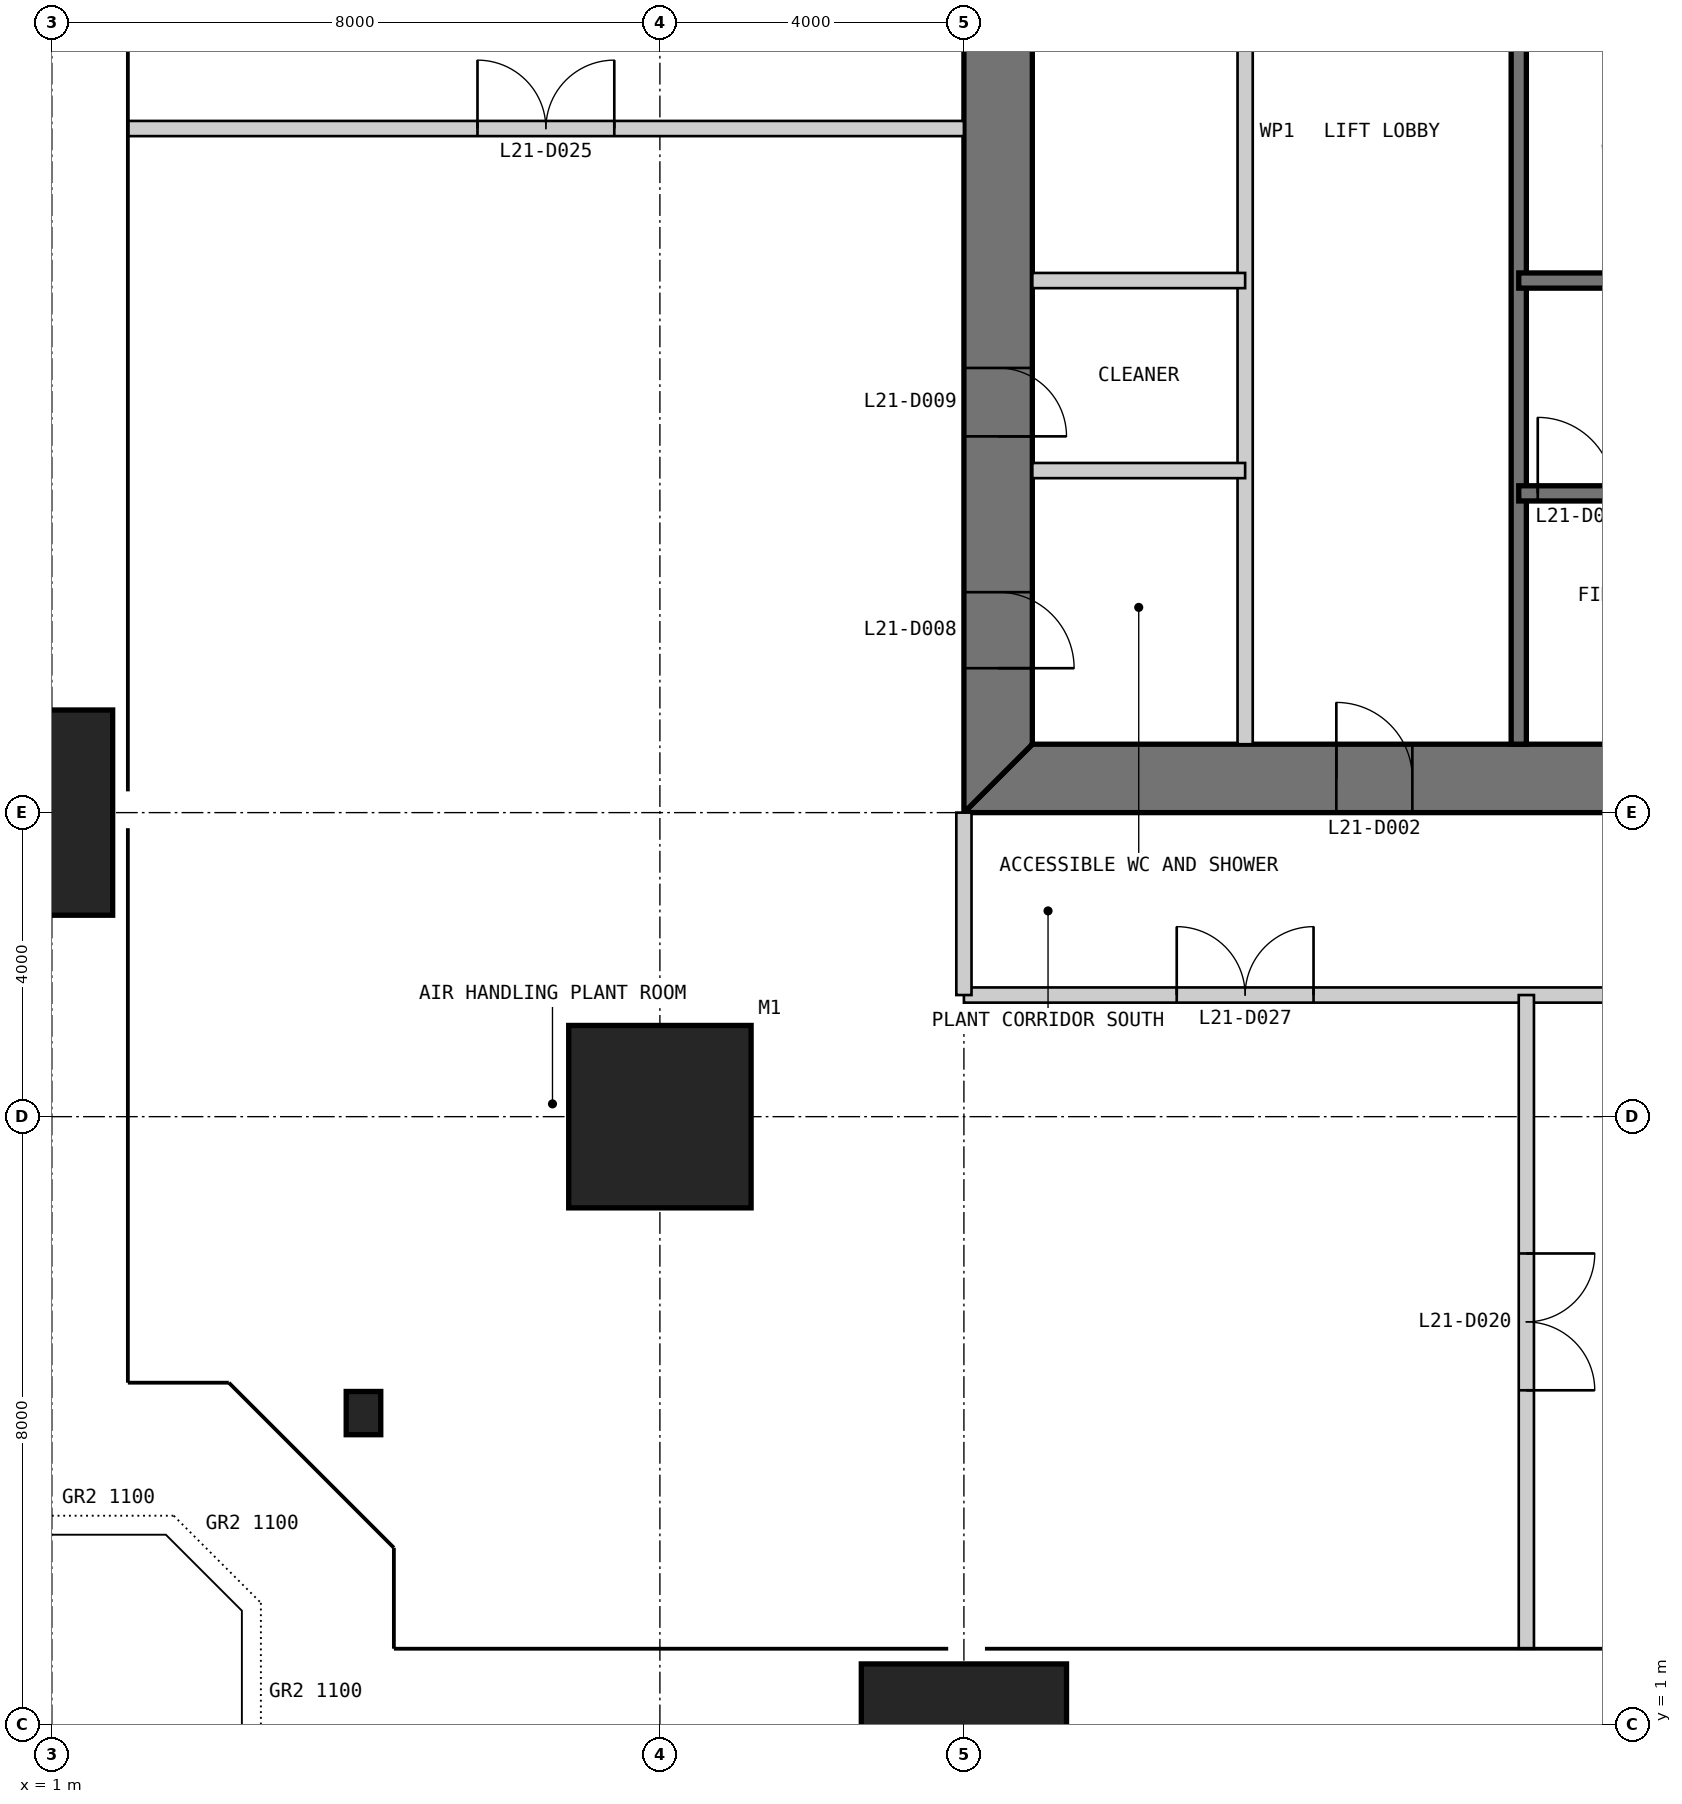
"""IFC4 building model, lengths in metres.
Left out: names, types, materials, properties, quantities, classifications, styles, units other than length and angle.
Written with IfcOpenShell. Run it as: python <this file> out.ifc"""

import sys

from ifc_helpers import new_model, si_unit, direction, frame, frame_2d, origin, origin_2d, place, context, subcontext, project, spatial, polyline, rectangle, i_section, outline, extrude, element, fill, save


model = new_model("IFC4")
c1 = context("Model", 3, precision=1e-05, world=origin(), true_north=direction((0.0, 1.0)))
c2 = subcontext(c1, "Body", "Model", "MODEL_VIEW")
j1 = project(units=[si_unit("LENGTHUNIT", "METRE"), si_unit("PLANEANGLEUNIT", "RADIAN")], contexts=[c1])
p1 = place(None, origin())
s1 = spatial("IfcSite", under=j1, at=p1, CompositionType="ELEMENT")
p2 = place(p1, origin())
s2 = spatial("IfcBuilding", under=s1, at=p2, CompositionType="ELEMENT")
p3 = place(p2, frame((0.0, 0.0, 91.0)))
s3 = spatial("IfcBuildingStorey", under=s2, at=p3, CompositionType="ELEMENT", Elevation=91.0)
p4 = place(p3, frame((9.0, 9.0, 0.0), z_axis=(0.0, 0.0, 1.0), x_axis=(1.0, 0.0, 0.0)))
e1 = element("IfcColumn", 1, at=p4, inside=s3, PredefinedType="COLUMN", context=c2, shape_type="SweptSolid", body=[
    extrude(rectangle(XDim=2.4, YDim=2.4, at=origin_2d()), origin(), (0.0, 0.0, 1.0), 6.0),
])
p5 = place(p3, frame((13.0, 1.0, 0.0), z_axis=(0.0, 0.0, 1.0), x_axis=(1.0, 0.0, 0.0)))
e2 = element("IfcColumn", 2, at=p5, inside=s3, PredefinedType="COLUMN", context=c2, shape_type="SweptSolid", body=[
    extrude(rectangle(XDim=2.7, YDim=1.6, at=origin_2d()), origin(), (0.0, 0.0, 1.0), 6.0),
])
p6 = place(p3, frame((1.0, 13.0, 0.0), z_axis=(0.0, 0.0, 1.0), x_axis=(1.0, 0.0, 0.0)))
e3 = element("IfcColumn", 3, at=p6, inside=s3, PredefinedType="COLUMN", context=c2, shape_type="SweptSolid", body=[
    extrude(rectangle(XDim=1.6, YDim=2.7, at=origin_2d()), origin(), (0.0, 0.0, 1.0), 6.0),
])
p7 = place(p3, frame((5.1, 5.1, 0.0), z_axis=(0.0, 0.0, 1.0), x_axis=(1.0, 0.0, 0.0)))
e4 = element("IfcColumn", 4, at=p7, inside=s3, PredefinedType="COLUMN", context=c2, shape_type="SweptSolid", body=[
    extrude(i_section(OverallWidth=0.455, OverallDepth=0.569, WebThickness=0.078, FlangeThickness=0.125, at=origin_2d()), origin(), (0.0, 0.0, 1.0), 4.6),
])
p8 = place(p3, frame((13.0, 13.45, 0.0), z_axis=(0.0, 0.0, 1.0), x_axis=(1.0, 0.0, 0.0)))
e5 = element("IfcWall", 5, at=p8, inside=s3, PredefinedType="SHEAR", context=c2, shape_type="SweptSolid", body=[
    extrude(outline(polyline([(0.0, -0.45), (24.0, -0.45), (23.1, 0.45), (0.9, 0.45), (0.0, -0.45)])), origin(), (0.0, 0.0, 1.0), 6.0),
])
p9 = place(p8, frame((4.9, 0.0, 0.0)))
e6 = element("IfcOpeningElement", 6, at=p9, cuts=e5, PredefinedType="OPENING", context=c2, shape_type="SweptSolid", body=[
    extrude(rectangle(XDim=1.0, YDim=2.2, at=frame_2d((0.5, 1.1))), frame((0.0, 0.46, 0.0), z_axis=(0.0, -1.0, 0.0), x_axis=(1.0, 0.0, 0.0)), (0.0, 0.0, 1.0), 0.92),
])
p10 = place(p8, frame((8.9, 0.0, 0.0)))
e7 = element("IfcOpeningElement", 7, at=p10, cuts=e5, PredefinedType="OPENING", context=c2, shape_type="SweptSolid", body=[
    extrude(rectangle(XDim=1.1, YDim=2.2, at=frame_2d((0.55, 1.1))), frame((0.0, 0.46, 0.0), z_axis=(0.0, -1.0, 0.0), x_axis=(1.0, 0.0, 0.0)), (0.0, 0.0, 1.0), 0.92),
])
p11 = place(p8, frame((15.05, 0.0, 0.0)))
e8 = element("IfcOpeningElement", 8, at=p11, cuts=e5, PredefinedType="OPENING", context=c2, shape_type="SweptSolid", body=[
    extrude(rectangle(XDim=0.9, YDim=2.2, at=frame_2d((0.45, 1.1))), frame((0.0, 0.46, 0.0), z_axis=(0.0, -1.0, 0.0), x_axis=(1.0, 0.0, 0.0)), (0.0, 0.0, 1.0), 0.92),
])
p12 = place(p8, frame((17.9, 0.0, 0.0)))
e9 = element("IfcOpeningElement", 9, at=p12, cuts=e5, PredefinedType="OPENING", context=c2, shape_type="SweptSolid", body=[
    extrude(rectangle(XDim=1.0, YDim=2.2, at=frame_2d((0.5, 1.1))), frame((0.0, 0.46, 0.0), z_axis=(0.0, -1.0, 0.0), x_axis=(1.0, 0.0, 0.0)), (0.0, 0.0, 1.0), 0.92),
])
p13 = place(p8, frame((21.4, 0.0, 0.0)))
e10 = element("IfcOpeningElement", 10, at=p13, cuts=e5, PredefinedType="OPENING", context=c2, shape_type="SweptSolid", body=[
    extrude(rectangle(XDim=1.0, YDim=2.2, at=frame_2d((0.5, 1.1))), frame((0.0, 0.46, 0.0), z_axis=(0.0, -1.0, 0.0), x_axis=(1.0, 0.0, 0.0)), (0.0, 0.0, 1.0), 0.92),
])
p14 = place(p3, frame((13.45, 36.1, 0.0), z_axis=(0.0, 0.0, 1.0), x_axis=(0.0, -1.0, 0.0)))
e11 = element("IfcWall", 11, at=p14, inside=s3, PredefinedType="SHEAR", context=c2, shape_type="SweptSolid", body=[
    extrude(outline(polyline([(-0.9, -0.45), (23.1, -0.45), (22.2, 0.45), (0.0, 0.45), (-0.9, -0.45)])), origin(), (0.0, 0.0, 1.0), 6.0),
])
p15 = place(p14, frame((20.2, 0.0, 0.0)))
e12 = element("IfcOpeningElement", 12, at=p15, cuts=e11, PredefinedType="OPENING", context=c2, shape_type="SweptSolid", body=[
    extrude(rectangle(XDim=1.0, YDim=2.2, at=frame_2d((0.5, 1.1))), frame((0.0, 0.46, 0.0), z_axis=(0.0, -1.0, 0.0), x_axis=(1.0, 0.0, 0.0)), (0.0, 0.0, 1.0), 0.92),
])
p16 = place(p14, frame((17.25, 0.0, 0.0)))
e13 = element("IfcOpeningElement", 13, at=p16, cuts=e11, PredefinedType="OPENING", context=c2, shape_type="SweptSolid", body=[
    extrude(rectangle(XDim=0.9, YDim=2.2, at=frame_2d((0.45, 1.1))), frame((0.0, 0.46, 0.0), z_axis=(0.0, -1.0, 0.0), x_axis=(1.0, 0.0, 0.0)), (0.0, 0.0, 1.0), 0.92),
])
p17 = place(p3, frame((16.7, 13.9, 0.0), z_axis=(0.0, 0.0, 1.0), x_axis=(0.0, 1.0, 0.0)))
e14 = element("IfcWall", 14, at=p17, inside=s3, PredefinedType="PARTITIONING", context=c2, shape_type="SweptSolid", body=[
    extrude(rectangle(XDim=16.1, YDim=0.2, at=frame_2d((8.05, 0.0))), origin(), (0.0, 0.0, 1.0), 5.8),
])
p18 = place(p3, frame((20.3, 13.9, 0.0), z_axis=(0.0, 0.0, 1.0), x_axis=(0.0, 1.0, 0.0)))
e15 = element("IfcWall", 15, at=p18, inside=s3, PredefinedType="SOLIDWALL", context=c2, shape_type="SweptSolid", body=[
    extrude(rectangle(XDim=16.1, YDim=0.2, at=frame_2d((8.05, 0.0))), origin(), (0.0, 0.0, 1.0), 5.8),
])
p19 = place(p3, frame((13.9, 20.0, 0.0), z_axis=(0.0, 0.0, 1.0), x_axis=(1.0, 0.0, 0.0)))
e16 = element("IfcWall", 16, at=p19, inside=s3, PredefinedType="PARTITIONING", context=c2, shape_type="SweptSolid", body=[
    extrude(rectangle(XDim=2.8, YDim=0.2, at=frame_2d((1.4, 0.0))), origin(), (0.0, 0.0, 1.0), 5.8),
])
p20 = place(p3, frame((20.3, 17.2, 0.0), z_axis=(0.0, 0.0, 1.0), x_axis=(1.0, 0.0, 0.0)))
e17 = element("IfcWall", 17, at=p20, inside=s3, PredefinedType="SOLIDWALL", context=c2, shape_type="SweptSolid", body=[
    extrude(rectangle(XDim=9.4, YDim=0.2, at=frame_2d((4.7, 0.0))), origin(), (0.0, 0.0, 1.0), 5.8),
])
p21 = place(p20, frame((0.25, 0.0, 0.0)))
e18 = element("IfcOpeningElement", 18, at=p21, cuts=e17, PredefinedType="OPENING", context=c2, shape_type="SweptSolid", body=[
    extrude(rectangle(XDim=1.0, YDim=2.2, at=frame_2d((0.5, 1.1))), frame((0.0, 0.11, 0.0), z_axis=(0.0, -1.0, 0.0), x_axis=(1.0, 0.0, 0.0)), (0.0, 0.0, 1.0), 0.22),
])
p22 = place(p3, frame((20.3, 20.0, 0.0), z_axis=(0.0, 0.0, 1.0), x_axis=(1.0, 0.0, 0.0)))
e19 = element("IfcWall", 19, at=p22, inside=s3, PredefinedType="SOLIDWALL", context=c2, shape_type="SweptSolid", body=[
    extrude(rectangle(XDim=15.8, YDim=0.2, at=frame_2d((7.9, 0.0))), origin(), (0.0, 0.0, 1.0), 5.8),
])
p23 = place(p3, frame((13.9, 17.5, 0.0), z_axis=(0.0, 0.0, 1.0), x_axis=(1.0, 0.0, 0.0)))
e20 = element("IfcWall", 20, at=p23, inside=s3, PredefinedType="PARTITIONING", context=c2, shape_type="SweptSolid", body=[
    extrude(rectangle(XDim=2.8, YDim=0.2, at=frame_2d((1.4, 0.0))), origin(), (0.0, 0.0, 1.0), 5.8),
])
p24 = place(p3, frame((13.0, 10.6, 0.0), z_axis=(0.0, 0.0, 1.0), x_axis=(1.0, 0.0, 0.0)))
e21 = element("IfcWall", 21, at=p24, inside=s3, PredefinedType="PARTITIONING", context=c2, shape_type="SweptSolid", body=[
    extrude(rectangle(XDim=24.0, YDim=0.2, at=frame_2d((12.0, 0.0))), origin(), (0.0, 0.0, 1.0), 5.8),
])
p25 = place(p24, frame((2.8, 0.0, 0.0)))
e22 = element("IfcOpeningElement", 22, at=p25, cuts=e21, PredefinedType="OPENING", context=c2, shape_type="SweptSolid", body=[
    extrude(rectangle(XDim=1.8, YDim=2.4, at=frame_2d((0.9, 1.2))), frame((0.0, 0.11, 0.0), z_axis=(0.0, -1.0, 0.0), x_axis=(1.0, 0.0, 0.0)), (0.0, 0.0, 1.0), 0.22),
])
p26 = place(p24, frame((11.25, 0.0, 0.0)))
e23 = element("IfcOpeningElement", 23, at=p26, cuts=e21, PredefinedType="OPENING", context=c2, shape_type="SweptSolid", body=[
    extrude(rectangle(XDim=1.8, YDim=2.4, at=frame_2d((0.9, 1.2))), frame((0.0, 0.11, 0.0), z_axis=(0.0, -1.0, 0.0), x_axis=(1.0, 0.0, 0.0)), (0.0, 0.0, 1.0), 0.22),
])
p27 = place(p24, frame((19.55, 0.0, 0.0)))
e24 = element("IfcOpeningElement", 24, at=p27, cuts=e21, PredefinedType="OPENING", context=c2, shape_type="SweptSolid", body=[
    extrude(rectangle(XDim=1.8, YDim=2.4, at=frame_2d((0.9, 1.2))), frame((0.0, 0.11, 0.0), z_axis=(0.0, -1.0, 0.0), x_axis=(1.0, 0.0, 0.0)), (0.0, 0.0, 1.0), 0.22),
])
p28 = place(p3, frame((13.0, 10.6, 0.0), z_axis=(0.0, 0.0, 1.0), x_axis=(0.0, 1.0, 0.0)))
e25 = element("IfcWall", 25, at=p28, inside=s3, PredefinedType="PARTITIONING", context=c2, shape_type="SweptSolid", body=[
    extrude(rectangle(XDim=2.4, YDim=0.2, at=frame_2d((1.2, 0.0))), origin(), (0.0, 0.0, 1.0), 4.853),
])
p29 = place(p3, frame((20.4, 2.0, 0.0), z_axis=(0.0, 0.0, 1.0), x_axis=(0.0, 1.0, 0.0)))
e26 = element("IfcWall", 26, at=p29, inside=s3, PredefinedType="PARTITIONING", context=c2, shape_type="SweptSolid", body=[
    extrude(rectangle(XDim=8.6, YDim=0.2, at=frame_2d((4.3, 0.0))), origin(), (0.0, 0.0, 1.0), 5.8),
])
p30 = place(p29, frame((3.4, 0.0, 0.0)))
e27 = element("IfcOpeningElement", 27, at=p30, cuts=e26, PredefinedType="OPENING", context=c2, shape_type="SweptSolid", body=[
    extrude(rectangle(XDim=1.8, YDim=2.4, at=frame_2d((0.9, 1.2))), frame((0.0, 0.11, 0.0), z_axis=(0.0, -1.0, 0.0), x_axis=(1.0, 0.0, 0.0)), (0.0, 0.0, 1.0), 0.22),
])
p31 = place(p3, frame((2.0, 22.0, 0.0), z_axis=(0.0, 0.0, 1.0), x_axis=(1.0, 0.0, 0.0)))
e28 = element("IfcWall", 28, at=p31, inside=s3, PredefinedType="PARTITIONING", context=c2, shape_type="SweptSolid", body=[
    extrude(rectangle(XDim=11.0, YDim=0.2, at=frame_2d((5.5, 0.0))), origin(), (0.0, 0.0, 1.0), 5.8),
])
p32 = place(p31, frame((4.6, 0.0, 0.0)))
e29 = element("IfcOpeningElement", 29, at=p32, cuts=e28, PredefinedType="OPENING", context=c2, shape_type="SweptSolid", body=[
    extrude(rectangle(XDim=1.8, YDim=2.4, at=frame_2d((0.9, 1.2))), frame((0.0, 0.11, 0.0), z_axis=(0.0, -1.0, 0.0), x_axis=(1.0, 0.0, 0.0)), (0.0, 0.0, 1.0), 0.22),
])
p33 = place(p9, origin())
e30 = element("IfcDoor", 30, at=p33, inside=s3, OperationType="SINGLE_SWING_LEFT", PredefinedType="DOOR", context=c2, shape_type="SweptSolid", body=[
    extrude(rectangle(XDim=1.0, YDim=2.2, at=frame_2d((0.5, 1.1))), frame((0.0, 0.025, 0.0), z_axis=(0.0, -1.0, 0.0), x_axis=(1.0, 0.0, 0.0)), (0.0, 0.0, 1.0), 0.05),
    extrude(outline(polyline([(0.0, 0.0), (0.04, 0.0), (0.04, 2.16), (0.96, 2.16), (0.96, 0.0), (1.0, 0.0), (1.0, 2.2), (0.0, 2.2), (0.0, 0.0)])), frame((0.0, 0.3, 0.0), z_axis=(0.0, -1.0, 0.0), x_axis=(1.0, 0.0, 0.0)), (0.0, 0.0, 1.0), 0.6),
])
fill(e6, e30)
p34 = place(p21, origin())
e31 = element("IfcDoor", 31, at=p34, inside=s3, OperationType="SINGLE_SWING_LEFT", PredefinedType="DOOR", context=c2, shape_type="SweptSolid", body=[
    extrude(rectangle(XDim=1.0, YDim=2.2, at=frame_2d((0.5, 1.1))), frame((0.0, 0.025, 0.0), z_axis=(0.0, -1.0, 0.0), x_axis=(1.0, 0.0, 0.0)), (0.0, 0.0, 1.0), 0.05),
])
fill(e18, e31)
p35 = place(p15, origin())
e32 = element("IfcDoor", 32, at=p35, inside=s3, OperationType="SINGLE_SWING_RIGHT", PredefinedType="DOOR", context=c2, shape_type="SweptSolid", body=[
    extrude(rectangle(XDim=1.0, YDim=2.2, at=frame_2d((0.5, 1.1))), frame((0.0, 0.025, 0.0), z_axis=(0.0, -1.0, 0.0), x_axis=(1.0, 0.0, 0.0)), (0.0, 0.0, 1.0), 0.05),
    extrude(outline(polyline([(0.0, 0.0), (0.04, 0.0), (0.04, 2.16), (0.96, 2.16), (0.96, 0.0), (1.0, 0.0), (1.0, 2.2), (0.0, 2.2), (0.0, 0.0)])), frame((0.0, 0.3, 0.0), z_axis=(0.0, -1.0, 0.0), x_axis=(1.0, 0.0, 0.0)), (0.0, 0.0, 1.0), 0.6),
])
fill(e12, e32)
p36 = place(p16, origin())
e33 = element("IfcDoor", 33, at=p36, inside=s3, OperationType="SINGLE_SWING_RIGHT", PredefinedType="DOOR", context=c2, shape_type="SweptSolid", body=[
    extrude(rectangle(XDim=0.9, YDim=2.2, at=frame_2d((0.45, 1.1))), frame((0.0, 0.025, 0.0), z_axis=(0.0, -1.0, 0.0), x_axis=(1.0, 0.0, 0.0)), (0.0, 0.0, 1.0), 0.05),
    extrude(outline(polyline([(0.0, 0.0), (0.04, 0.0), (0.04, 2.16), (0.86, 2.16), (0.86, 0.0), (0.9, 0.0), (0.9, 2.2), (0.0, 2.2), (0.0, 0.0)])), frame((0.0, 0.3, 0.0), z_axis=(0.0, -1.0, 0.0), x_axis=(1.0, 0.0, 0.0)), (0.0, 0.0, 1.0), 0.6),
])
fill(e13, e33)
p37 = place(p30, frame((1.8, 0.0, 0.0), z_axis=(0.0, 0.0, 1.0), x_axis=(-1.0, 0.0, 0.0)))
e34 = element("IfcDoor", 34, at=p37, inside=s3, OperationType="DOUBLE_DOOR_SINGLE_SWING", PredefinedType="DOOR", context=c2, shape_type="SweptSolid", body=[
    extrude(rectangle(XDim=1.8, YDim=2.4, at=frame_2d((0.9, 1.2))), frame((0.0, 0.025, 0.0), z_axis=(0.0, -1.0, 0.0), x_axis=(1.0, 0.0, 0.0)), (0.0, 0.0, 1.0), 0.05),
])
fill(e27, e34)
p38 = place(p32, origin())
e35 = element("IfcDoor", 35, at=p38, inside=s3, OperationType="DOUBLE_DOOR_SINGLE_SWING", PredefinedType="DOOR", context=c2, shape_type="SweptSolid", body=[
    extrude(rectangle(XDim=1.8, YDim=2.4, at=frame_2d((0.9, 1.2))), frame((0.0, 0.025, 0.0), z_axis=(0.0, -1.0, 0.0), x_axis=(1.0, 0.0, 0.0)), (0.0, 0.0, 1.0), 0.05),
])
fill(e29, e35)
p39 = place(p25, origin())
e36 = element("IfcDoor", 36, at=p39, inside=s3, OperationType="DOUBLE_DOOR_SINGLE_SWING", PredefinedType="DOOR", context=c2, shape_type="SweptSolid", body=[
    extrude(rectangle(XDim=1.8, YDim=2.4, at=frame_2d((0.9, 1.2))), frame((0.0, 0.025, 0.0), z_axis=(0.0, -1.0, 0.0), x_axis=(1.0, 0.0, 0.0)), (0.0, 0.0, 1.0), 0.05),
])
fill(e22, e36)
save(model, sys.argv[1])
